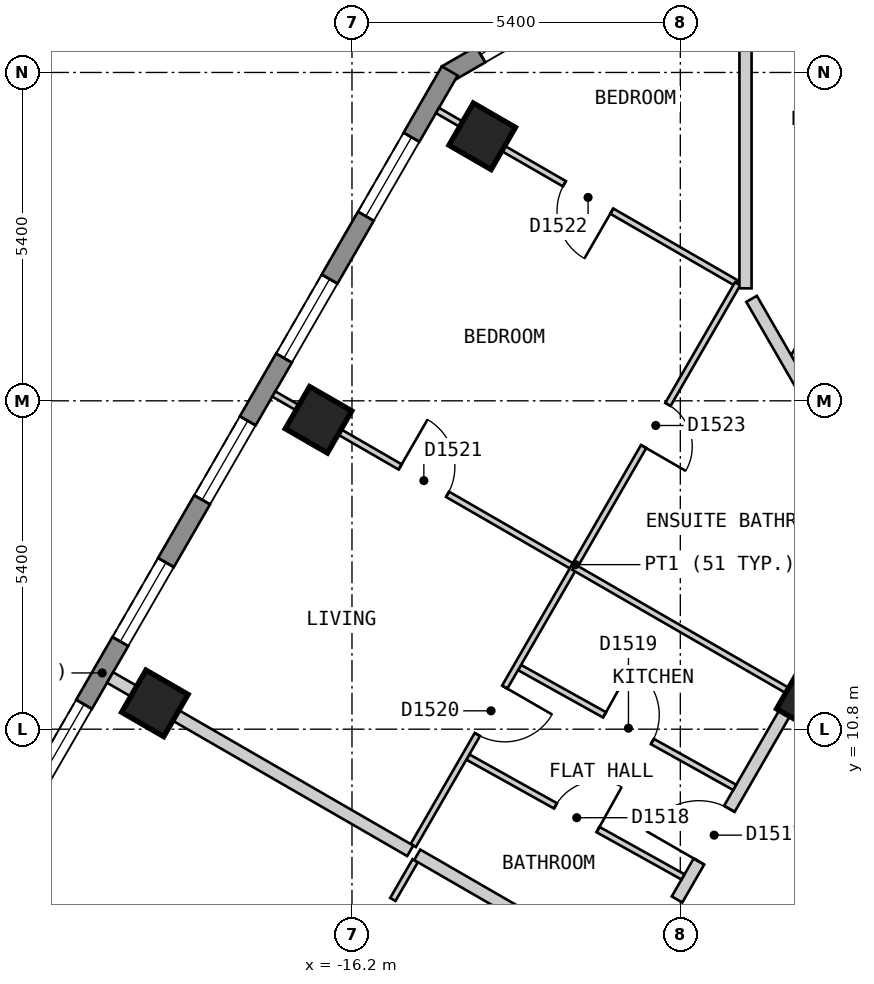
"""IFC4 building model, lengths in metres.
Left out: names, types, materials, properties, quantities, classifications, styles, units other than length and angle.
Written with IfcOpenShell. Run it as: python <this file> out.ifc"""

import sys

from ifc_helpers import new_model, si_unit, direction, frame, frame_2d, origin, origin_2d, place, context, subcontext, project, spatial, polyline, rectangle, outline, extrude, element, fill, save


model = new_model("IFC4")
c1 = context("Model", 3, precision=1e-05, world=origin(), true_north=direction((0.0, 1.0)))
c2 = subcontext(c1, "Body", "Model", "MODEL_VIEW")
j1 = project(units=[si_unit("LENGTHUNIT", "METRE"), si_unit("PLANEANGLEUNIT", "RADIAN")], contexts=[c1])
p1 = place(None, origin())
s1 = spatial("IfcSite", under=j1, at=p1, CompositionType="ELEMENT")
p2 = place(p1, origin())
s2 = spatial("IfcBuilding", under=s1, at=p2, CompositionType="ELEMENT")
p3 = place(p2, frame((0.0, 0.0, 196.2)))
s3 = spatial("IfcBuildingStorey", under=s2, at=p3, CompositionType="ELEMENT", Elevation=196.2)
for number, where, z_axis, x_axis in (
    (1, (-14.058, 20.55, 0.0), (0.0, 0.0, 1.0), (-0.5, -0.866, 0.0)),
    (2, (-16.75, 15.888, 0.0), (0.0, 0.0, 1.0), (-0.5, -0.866, 0.0)),
    (3, (-19.442, 11.225, 0.0), (0.0, 0.0, 1.0), (-0.5, -0.866, 0.0)),
):
    element("IfcColumn", number, at=place(p3, frame(where, z_axis=z_axis, x_axis=x_axis)), inside=s3, PredefinedType="COLUMN", context=c2, shape_type="SweptSolid", body=[
        extrude(rectangle(XDim=0.8, YDim=0.8, at=origin_2d()), origin(), (0.0, 0.0, 1.0), 3.0),
    ])
p4 = place(p3, frame((-8.739, 11.263, 0.0), z_axis=(0.0, 0.0, 1.0), x_axis=(-0.5, -0.866025403784, 0.0)))
e4 = element("IfcColumn", 4, at=p4, inside=s3, PredefinedType="COLUMN", context=c2, shape_type="SweptSolid", body=[
    extrude(rectangle(XDim=0.7, YDim=0.7, at=origin_2d()), origin(), (0.0, 0.0, 1.0), 3.0),
])
p5 = place(p3, frame((-10.317, 24.07, 0.0), z_axis=(0.0, 0.0, 1.0), x_axis=(-0.866022959057, -0.500004234368, 0.0)))
e5 = element("IfcWall", 5, at=p5, inside=s3, PredefinedType="SOLIDWALL", context=c2, shape_type="SweptSolid", body=[
    extrude(outline(polyline([(0.0, -0.15), (5.0, -0.15), (4.92, 0.15), (0.08, 0.15), (0.0, -0.15)])), origin(), (0.0, 0.0, 1.0), 2.6),
])
p6 = place(p5, frame((0.65, 0.0, 0.15)))
e6 = element("IfcOpeningElement", 6, at=p6, cuts=e5, PredefinedType="OPENING", context=c2, shape_type="SweptSolid", body=[
    extrude(rectangle(XDim=1.2, YDim=2.1, at=frame_2d((0.6, 1.05))), frame((0.0, 0.16, 0.0), z_axis=(0.0, -1.0, 0.0), x_axis=(1.0, 0.0, 0.0)), (0.0, 0.0, 1.0), 0.32),
])
p7 = place(p5, frame((3.149, 0.0, 0.15)))
e7 = element("IfcOpeningElement", 7, at=p7, cuts=e5, PredefinedType="OPENING", context=c2, shape_type="SweptSolid", body=[
    extrude(rectangle(XDim=1.2, YDim=2.1, at=frame_2d((0.6, 1.05))), frame((0.0, 0.16, 0.0), z_axis=(0.0, -1.0, 0.0), x_axis=(1.0, 0.0, 0.0)), (0.0, 0.0, 1.0), 0.32),
])
p8 = place(p3, frame((-14.592, 21.625, 0.0), z_axis=(0.0, 0.0, 1.0), x_axis=(-0.500010537973, -0.866019319597, 0.0)))
e8 = element("IfcWall", 8, at=p8, inside=s3, PredefinedType="SOLIDWALL", context=c2, shape_type="SweptSolid", body=[
    extrude(outline(polyline([(0.0, -0.15), (22.863, -0.15), (22.783, 0.15), (0.08, 0.15), (0.0, -0.15)])), origin(), (0.0, 0.0, 1.0), 2.6),
])
p9 = place(p8, frame((1.259, 0.0, 0.15)))
e9 = element("IfcOpeningElement", 9, at=p9, cuts=e8, PredefinedType="OPENING", context=c2, shape_type="SweptSolid", body=[
    extrude(rectangle(XDim=1.5, YDim=2.1, at=frame_2d((0.75, 1.05))), frame((0.0, 0.16, 0.0), z_axis=(0.0, -1.0, 0.0), x_axis=(1.0, 0.0, 0.0)), (0.0, 0.0, 1.0), 0.32),
])
p10 = place(p8, frame((3.952, 0.0, 0.15)))
e10 = element("IfcOpeningElement", 10, at=p10, cuts=e8, PredefinedType="OPENING", context=c2, shape_type="SweptSolid", body=[
    extrude(rectangle(XDim=1.5, YDim=2.1, at=frame_2d((0.75, 1.05))), frame((0.0, 0.16, 0.0), z_axis=(0.0, -1.0, 0.0), x_axis=(1.0, 0.0, 0.0)), (0.0, 0.0, 1.0), 0.32),
])
p11 = place(p8, frame((6.644, 0.0, 0.15)))
e11 = element("IfcOpeningElement", 11, at=p11, cuts=e8, PredefinedType="OPENING", context=c2, shape_type="SweptSolid", body=[
    extrude(rectangle(XDim=1.5, YDim=2.1, at=frame_2d((0.75, 1.05))), frame((0.0, 0.16, 0.0), z_axis=(0.0, -1.0, 0.0), x_axis=(1.0, 0.0, 0.0)), (0.0, 0.0, 1.0), 0.32),
])
p12 = place(p8, frame((9.335, 0.0, 0.15)))
e12 = element("IfcOpeningElement", 12, at=p12, cuts=e8, PredefinedType="OPENING", context=c2, shape_type="SweptSolid", body=[
    extrude(rectangle(XDim=1.5, YDim=2.1, at=frame_2d((0.75, 1.05))), frame((0.0, 0.16, 0.0), z_axis=(0.0, -1.0, 0.0), x_axis=(1.0, 0.0, 0.0)), (0.0, 0.0, 1.0), 0.32),
])
p13 = place(p8, frame((12.028, 0.0, 0.15)))
e13 = element("IfcOpeningElement", 13, at=p13, cuts=e8, PredefinedType="OPENING", context=c2, shape_type="SweptSolid", body=[
    extrude(rectangle(XDim=1.5, YDim=2.1, at=frame_2d((0.75, 1.05))), frame((0.0, 0.16, 0.0), z_axis=(0.0, -1.0, 0.0), x_axis=(1.0, 0.0, 0.0)), (0.0, 0.0, 1.0), 0.32),
])
p14 = place(p8, frame((14.72, 0.0, 0.15)))
e14 = element("IfcOpeningElement", 14, at=p14, cuts=e8, PredefinedType="OPENING", context=c2, shape_type="SweptSolid", body=[
    extrude(rectangle(XDim=1.5, YDim=2.1, at=frame_2d((0.75, 1.05))), frame((0.0, 0.16, 0.0), z_axis=(0.0, -1.0, 0.0), x_axis=(1.0, 0.0, 0.0)), (0.0, 0.0, 1.0), 0.32),
])
p15 = place(p8, frame((17.411, 0.0, 0.15)))
e15 = element("IfcOpeningElement", 15, at=p15, cuts=e8, PredefinedType="OPENING", context=c2, shape_type="SweptSolid", body=[
    extrude(rectangle(XDim=1.5, YDim=2.1, at=frame_2d((0.75, 1.05))), frame((0.0, 0.16, 0.0), z_axis=(0.0, -1.0, 0.0), x_axis=(1.0, 0.0, 0.0)), (0.0, 0.0, 1.0), 0.32),
])
p16 = place(p8, frame((20.104, 0.0, 0.15)))
e16 = element("IfcOpeningElement", 16, at=p16, cuts=e8, PredefinedType="OPENING", context=c2, shape_type="SweptSolid", body=[
    extrude(rectangle(XDim=1.5, YDim=2.1, at=frame_2d((0.75, 1.05))), frame((0.0, 0.16, 0.0), z_axis=(0.0, -1.0, 0.0), x_axis=(1.0, 0.0, 0.0)), (0.0, 0.0, 1.0), 0.32),
])
p17 = place(p3, frame((-10.854, 8.0, 0.0), z_axis=(0.0, 0.0, 1.0), x_axis=(0.499997637144, 0.866026767976, 0.0)))
e17 = element("IfcWall", 17, at=p17, inside=s3, PredefinedType="PARTITIONING", context=c2, shape_type="SweptSolid", body=[
    extrude(rectangle(XDim=10.854, YDim=0.2, at=frame_2d((5.427, 0.0))), origin(), (0.0, 0.0, 1.0), 2.6),
])
p18 = place(p17, frame((0.721, 0.0, 0.0)))
e18 = element("IfcOpeningElement", 18, at=p18, cuts=e17, PredefinedType="OPENING", context=c2, shape_type="SweptSolid", body=[
    extrude(rectangle(XDim=1.0, YDim=2.1, at=frame_2d((0.5, 1.05))), frame((0.0, 0.11, 0.0), z_axis=(0.0, -1.0, 0.0), x_axis=(1.0, 0.0, 0.0)), (0.0, 0.0, 1.0), 0.22),
])
p19 = place(p3, frame((-13.444, 11.814, 0.0), z_axis=(0.0, 0.0, 1.0), x_axis=(0.873653620945, -0.486548405207, 0.0)))
e19 = element("IfcWall", 19, at=p19, inside=s3, PredefinedType="PARTITIONING", context=c2, shape_type="SweptSolid", body=[
    extrude(rectangle(XDim=4.051, YDim=0.1, at=frame_2d((2.025, 0.0))), origin(), (0.0, 0.0, 1.0), 2.6),
])
p20 = place(p19, frame((1.6, 0.0, 0.0)))
e20 = element("IfcOpeningElement", 20, at=p20, cuts=e19, PredefinedType="OPENING", context=c2, shape_type="SweptSolid", body=[
    extrude(rectangle(XDim=0.9, YDim=2.1, at=frame_2d((0.45, 1.05))), frame((0.0, 0.06, 0.0), z_axis=(0.0, -1.0, 0.0), x_axis=(1.0, 0.0, 0.0)), (0.0, 0.0, 1.0), 0.12),
])
p21 = place(p3, frame((-14.294, 10.342, 0.0), z_axis=(0.0, 0.0, 1.0), x_axis=(0.873582256032, -0.486676527013, 0.0)))
e21 = element("IfcWall", 21, at=p21, inside=s3, PredefinedType="PARTITIONING", context=c2, shape_type="SweptSolid", body=[
    extrude(rectangle(XDim=4.05, YDim=0.1, at=frame_2d((2.025, 0.0))), origin(), (0.0, 0.0, 1.0), 2.6),
])
p22 = place(p21, frame((1.65, 0.0, 0.0)))
e22 = element("IfcOpeningElement", 22, at=p22, cuts=e21, PredefinedType="OPENING", context=c2, shape_type="SweptSolid", body=[
    extrude(rectangle(XDim=0.8, YDim=2.1, at=frame_2d((0.4, 1.05))), frame((0.0, 0.06, 0.0), z_axis=(0.0, -1.0, 0.0), x_axis=(1.0, 0.0, 0.0)), (0.0, 0.0, 1.0), 0.12),
])
p23 = place(p3, frame((-17.486, 16.313, 0.0), z_axis=(0.0, 0.0, 1.0), x_axis=(0.866004402611, -0.500036373335, 0.0)))
e23 = element("IfcWall", 23, at=p23, inside=s3, PredefinedType="PARTITIONING", context=c2, shape_type="SweptSolid", body=[
    extrude(rectangle(XDim=5.7, YDim=0.1, at=frame_2d((2.85, 0.0))), origin(), (0.0, 0.0, 1.0), 2.6),
])
p24 = place(p23, frame((2.4, 0.0, 0.0)))
e24 = element("IfcOpeningElement", 24, at=p24, cuts=e23, PredefinedType="OPENING", context=c2, shape_type="SweptSolid", body=[
    extrude(rectangle(XDim=0.9, YDim=2.1, at=frame_2d((0.45, 1.05))), frame((0.0, 0.06, 0.0), z_axis=(0.0, -1.0, 0.0), x_axis=(1.0, 0.0, 0.0)), (0.0, 0.0, 1.0), 0.12),
])
p25 = place(p3, frame((-14.794, 20.975, 0.0), z_axis=(0.0, 0.0, 1.0), x_axis=(0.865989811779, -0.500061642096, 0.0)))
e25 = element("IfcWall", 25, at=p25, inside=s3, PredefinedType="PARTITIONING", context=c2, shape_type="SweptSolid", body=[
    extrude(rectangle(XDim=5.67, YDim=0.1, at=frame_2d((2.835, 0.0))), origin(), (0.0, 0.0, 1.0), 2.6),
])
p26 = place(p25, frame((2.41, 0.0, 0.0)))
e26 = element("IfcOpeningElement", 26, at=p26, cuts=e25, PredefinedType="OPENING", context=c2, shape_type="SweptSolid", body=[
    extrude(rectangle(XDim=0.9, YDim=2.1, at=frame_2d((0.45, 1.05))), frame((0.0, 0.06, 0.0), z_axis=(0.0, -1.0, 0.0), x_axis=(1.0, 0.0, 0.0)), (0.0, 0.0, 1.0), 0.12),
])
p27 = place(p3, frame((-8.949, 16.9, 0.0), z_axis=(0.0, 0.0, 1.0), x_axis=(0.499949850951, 0.866054355415, 0.0)))
e27 = element("IfcWall", 27, at=p27, inside=s3, PredefinedType="PARTITIONING", context=c2, shape_type="SweptSolid", body=[
    extrude(rectangle(XDim=3.811, YDim=0.1, at=frame_2d((1.905, 0.0))), origin(), (0.0, 0.0, 1.0), 2.6),
])
p28 = place(p27, frame((1.992, 0.0, 0.0)))
e28 = element("IfcOpeningElement", 28, at=p28, cuts=e27, PredefinedType="OPENING", context=c2, shape_type="SweptSolid", body=[
    extrude(rectangle(XDim=0.8, YDim=2.1, at=frame_2d((0.4, 1.05))), frame((0.0, 0.06, 0.0), z_axis=(0.0, -1.0, 0.0), x_axis=(1.0, 0.0, 0.0)), (0.0, 0.0, 1.0), 0.12),
])
p29 = place(p3, frame((-15.528, 8.0, 0.0), z_axis=(0.0, 0.0, 1.0), x_axis=(0.500421336976, 0.865782008071, 0.0)))
e29 = element("IfcWall", 29, at=p29, inside=s3, PredefinedType="PARTITIONING", context=c2, shape_type="SweptSolid", body=[
    extrude(rectangle(XDim=0.736, YDim=0.1, at=frame_2d((0.368, 0.0))), origin(), (0.0, 0.0, 1.0), 2.6),
])
p30 = place(p3, frame((-15.192, 8.887, 0.0), z_axis=(0.0, 0.0, 1.0), x_axis=(0.500028204665, 0.866009119201, 0.0)))
e30 = element("IfcWall", 30, at=p30, inside=s3, PredefinedType="PARTITIONING", context=c2, shape_type="SweptSolid", body=[
    extrude(rectangle(XDim=10.667, YDim=0.1, at=frame_2d((5.334, 0.0))), origin(), (0.0, 0.0, 1.0), 2.6),
])
p31 = place(p30, frame((2.108, 0.0, 0.0)))
e31 = element("IfcOpeningElement", 31, at=p31, cuts=e30, PredefinedType="OPENING", context=c2, shape_type="SweptSolid", body=[
    extrude(rectangle(XDim=0.9, YDim=2.1, at=frame_2d((0.45, 1.05))), frame((0.0, 0.06, 0.0), z_axis=(0.0, -1.0, 0.0), x_axis=(1.0, 0.0, 0.0)), (0.0, 0.0, 1.0), 0.12),
])
p32 = place(p30, frame((7.576, 0.0, 0.0)))
e32 = element("IfcOpeningElement", 32, at=p32, cuts=e30, PredefinedType="OPENING", context=c2, shape_type="SweptSolid", body=[
    extrude(rectangle(XDim=0.8, YDim=2.1, at=frame_2d((0.4, 1.05))), frame((0.0, 0.06, 0.0), z_axis=(0.0, -1.0, 0.0), x_axis=(1.0, 0.0, 0.0)), (0.0, 0.0, 1.0), 0.12),
])
p33 = place(p3, frame((-9.628, 17.877, 0.0), z_axis=(0.0, 0.0, 1.0), x_axis=(0.499890461358, -0.866088636713, 0.0)))
e33 = element("IfcWall", 33, at=p33, inside=s3, PredefinedType="PARTITIONING", context=c2, shape_type="SweptSolid", body=[
    extrude(rectangle(XDim=4.361, YDim=0.2, at=frame_2d((2.18, 0.0))), origin(), (0.0, 0.0, 1.0), 2.6),
])
p34 = place(p3, frame((-20.178, 11.65, 0.0), z_axis=(0.0, 0.0, 1.0), x_axis=(0.866022950691, -0.500004248858, 0.0)))
e34 = element("IfcWall", 34, at=p34, inside=s3, PredefinedType="PARTITIONING", context=c2, shape_type="SweptSolid", body=[
    extrude(rectangle(XDim=5.7, YDim=0.2, at=frame_2d((2.85, 0.0))), origin(), (0.0, 0.0, 1.0), 2.6),
])
p35 = place(p3, frame((-15.127, 8.734, 0.0), z_axis=(0.0, 0.0, 1.0), x_axis=(0.865984601828, -0.500070664403, 0.0)))
e35 = element("IfcWall", 35, at=p35, inside=s3, PredefinedType="PARTITIONING", context=c2, shape_type="SweptSolid", body=[
    extrude(rectangle(XDim=4.167, YDim=0.2, at=frame_2d((2.084, 0.0))), origin(), (0.0, 0.0, 1.0), 2.6),
])
p36 = place(p3, frame((-9.728, 18.05, 0.0), z_axis=(0.0, 0.0, 1.0), x_axis=(0.0, 1.0, 0.0)))
e36 = element("IfcWall", 36, at=p36, inside=s3, PredefinedType="PARTITIONING", context=c2, shape_type="SweptSolid", body=[
    extrude(rectangle(XDim=5.85, YDim=0.2, at=frame_2d((2.925, 0.0))), origin(), (0.0, 0.0, 1.0), 2.6),
])
p37 = place(p3, frame((-12.55, 13.463, 0.0), z_axis=(0.0, 0.0, 1.0), x_axis=(0.86606561423, -0.499930346997, 0.0)))
e37 = element("IfcWall", 37, at=p37, inside=s3, PredefinedType="PARTITIONING", context=c2, shape_type="SweptSolid", body=[
    extrude(rectangle(XDim=4.1, YDim=0.1, at=frame_2d((2.05, 0.0))), origin(), (0.0, 0.0, 1.0), 2.6),
])
p38 = place(p7, origin())
e38 = element("IfcWindow", 38, at=p38, inside=s3, PartitioningType="SINGLE_PANEL", PredefinedType="WINDOW", context=c2, shape_type="SweptSolid", body=[
    extrude(rectangle(XDim=1.2, YDim=2.1, at=frame_2d((0.6, 1.05))), frame((0.0, 0.03, 0.0), z_axis=(0.0, -1.0, 0.0), x_axis=(1.0, 0.0, 0.0)), (0.0, 0.0, 1.0), 0.06),
])
fill(e7, e38)
p39 = place(p9, origin())
e39 = element("IfcWindow", 39, at=p39, inside=s3, PartitioningType="SINGLE_PANEL", PredefinedType="WINDOW", context=c2, shape_type="SweptSolid", body=[
    extrude(rectangle(XDim=1.5, YDim=2.1, at=frame_2d((0.75, 1.05))), frame((0.0, 0.03, 0.0), z_axis=(0.0, -1.0, 0.0), x_axis=(1.0, 0.0, 0.0)), (0.0, 0.0, 1.0), 0.06),
])
fill(e9, e39)
p40 = place(p10, origin())
e40 = element("IfcWindow", 40, at=p40, inside=s3, PartitioningType="SINGLE_PANEL", PredefinedType="WINDOW", context=c2, shape_type="SweptSolid", body=[
    extrude(rectangle(XDim=1.5, YDim=2.1, at=frame_2d((0.75, 1.05))), frame((0.0, 0.03, 0.0), z_axis=(0.0, -1.0, 0.0), x_axis=(1.0, 0.0, 0.0)), (0.0, 0.0, 1.0), 0.06),
])
fill(e10, e40)
p41 = place(p11, origin())
e41 = element("IfcWindow", 41, at=p41, inside=s3, PartitioningType="SINGLE_PANEL", PredefinedType="WINDOW", context=c2, shape_type="SweptSolid", body=[
    extrude(rectangle(XDim=1.5, YDim=2.1, at=frame_2d((0.75, 1.05))), frame((0.0, 0.03, 0.0), z_axis=(0.0, -1.0, 0.0), x_axis=(1.0, 0.0, 0.0)), (0.0, 0.0, 1.0), 0.06),
])
fill(e11, e41)
p42 = place(p12, origin())
e42 = element("IfcWindow", 42, at=p42, inside=s3, PartitioningType="SINGLE_PANEL", PredefinedType="WINDOW", context=c2, shape_type="SweptSolid", body=[
    extrude(rectangle(XDim=1.5, YDim=2.1, at=frame_2d((0.75, 1.05))), frame((0.0, 0.03, 0.0), z_axis=(0.0, -1.0, 0.0), x_axis=(1.0, 0.0, 0.0)), (0.0, 0.0, 1.0), 0.06),
])
fill(e12, e42)
p43 = place(p13, origin())
e43 = element("IfcWindow", 43, at=p43, inside=s3, PartitioningType="SINGLE_PANEL", PredefinedType="WINDOW", context=c2, shape_type="SweptSolid", body=[
    extrude(rectangle(XDim=1.5, YDim=2.1, at=frame_2d((0.75, 1.05))), frame((0.0, 0.03, 0.0), z_axis=(0.0, -1.0, 0.0), x_axis=(1.0, 0.0, 0.0)), (0.0, 0.0, 1.0), 0.06),
])
fill(e13, e43)
p44 = place(p18, origin())
e44 = element("IfcDoor", 44, at=p44, inside=s3, OperationType="SINGLE_SWING_LEFT", PredefinedType="DOOR", context=c2, shape_type="SweptSolid", body=[
    extrude(rectangle(XDim=1.0, YDim=2.1, at=frame_2d((0.5, 1.05))), frame((0.0, 0.025, 0.0), z_axis=(0.0, -1.0, 0.0), x_axis=(1.0, 0.0, 0.0)), (0.0, 0.0, 1.0), 0.05),
])
fill(e18, e44)
p45 = place(p22, origin())
e45 = element("IfcDoor", 45, at=p45, inside=s3, OperationType="SINGLE_SWING_RIGHT", PredefinedType="DOOR", context=c2, shape_type="SweptSolid", body=[
    extrude(rectangle(XDim=0.8, YDim=2.1, at=frame_2d((0.4, 1.05))), frame((0.0, 0.025, 0.0), z_axis=(0.0, -1.0, 0.0), x_axis=(1.0, 0.0, 0.0)), (0.0, 0.0, 1.0), 0.05),
])
fill(e22, e45)
p46 = place(p20, origin())
e46 = element("IfcDoor", 46, at=p46, inside=s3, OperationType="SINGLE_SWING_LEFT", PredefinedType="DOOR", context=c2, shape_type="SweptSolid", body=[
    extrude(rectangle(XDim=0.9, YDim=2.1, at=frame_2d((0.45, 1.05))), frame((0.0, 0.025, 0.0), z_axis=(0.0, -1.0, 0.0), x_axis=(1.0, 0.0, 0.0)), (0.0, 0.0, 1.0), 0.05),
])
fill(e20, e46)
p47 = place(p31, origin())
e47 = element("IfcDoor", 47, at=p47, inside=s3, OperationType="SINGLE_SWING_RIGHT", PredefinedType="DOOR", context=c2, shape_type="SweptSolid", body=[
    extrude(rectangle(XDim=0.9, YDim=2.1, at=frame_2d((0.45, 1.05))), frame((0.0, 0.025, 0.0), z_axis=(0.0, -1.0, 0.0), x_axis=(1.0, 0.0, 0.0)), (0.0, 0.0, 1.0), 0.05),
])
fill(e31, e47)
p48 = place(p24, origin())
e48 = element("IfcDoor", 48, at=p48, inside=s3, OperationType="SINGLE_SWING_LEFT", PredefinedType="DOOR", context=c2, shape_type="SweptSolid", body=[
    extrude(rectangle(XDim=0.9, YDim=2.1, at=frame_2d((0.45, 1.05))), frame((0.0, 0.025, 0.0), z_axis=(0.0, -1.0, 0.0), x_axis=(1.0, 0.0, 0.0)), (0.0, 0.0, 1.0), 0.05),
])
fill(e24, e48)
p49 = place(p26, origin())
e49 = element("IfcDoor", 49, at=p49, inside=s3, OperationType="SINGLE_SWING_RIGHT", PredefinedType="DOOR", context=c2, shape_type="SweptSolid", body=[
    extrude(rectangle(XDim=0.9, YDim=2.1, at=frame_2d((0.45, 1.05))), frame((0.0, 0.025, 0.0), z_axis=(0.0, -1.0, 0.0), x_axis=(1.0, 0.0, 0.0)), (0.0, 0.0, 1.0), 0.05),
])
fill(e26, e49)
p50 = place(p32, origin())
e50 = element("IfcDoor", 50, at=p50, inside=s3, OperationType="SINGLE_SWING_LEFT", PredefinedType="DOOR", context=c2, shape_type="SweptSolid", body=[
    extrude(rectangle(XDim=0.8, YDim=2.1, at=frame_2d((0.4, 1.05))), frame((0.0, 0.025, 0.0), z_axis=(0.0, -1.0, 0.0), x_axis=(1.0, 0.0, 0.0)), (0.0, 0.0, 1.0), 0.05),
])
fill(e32, e50)
save(model, sys.argv[1])
